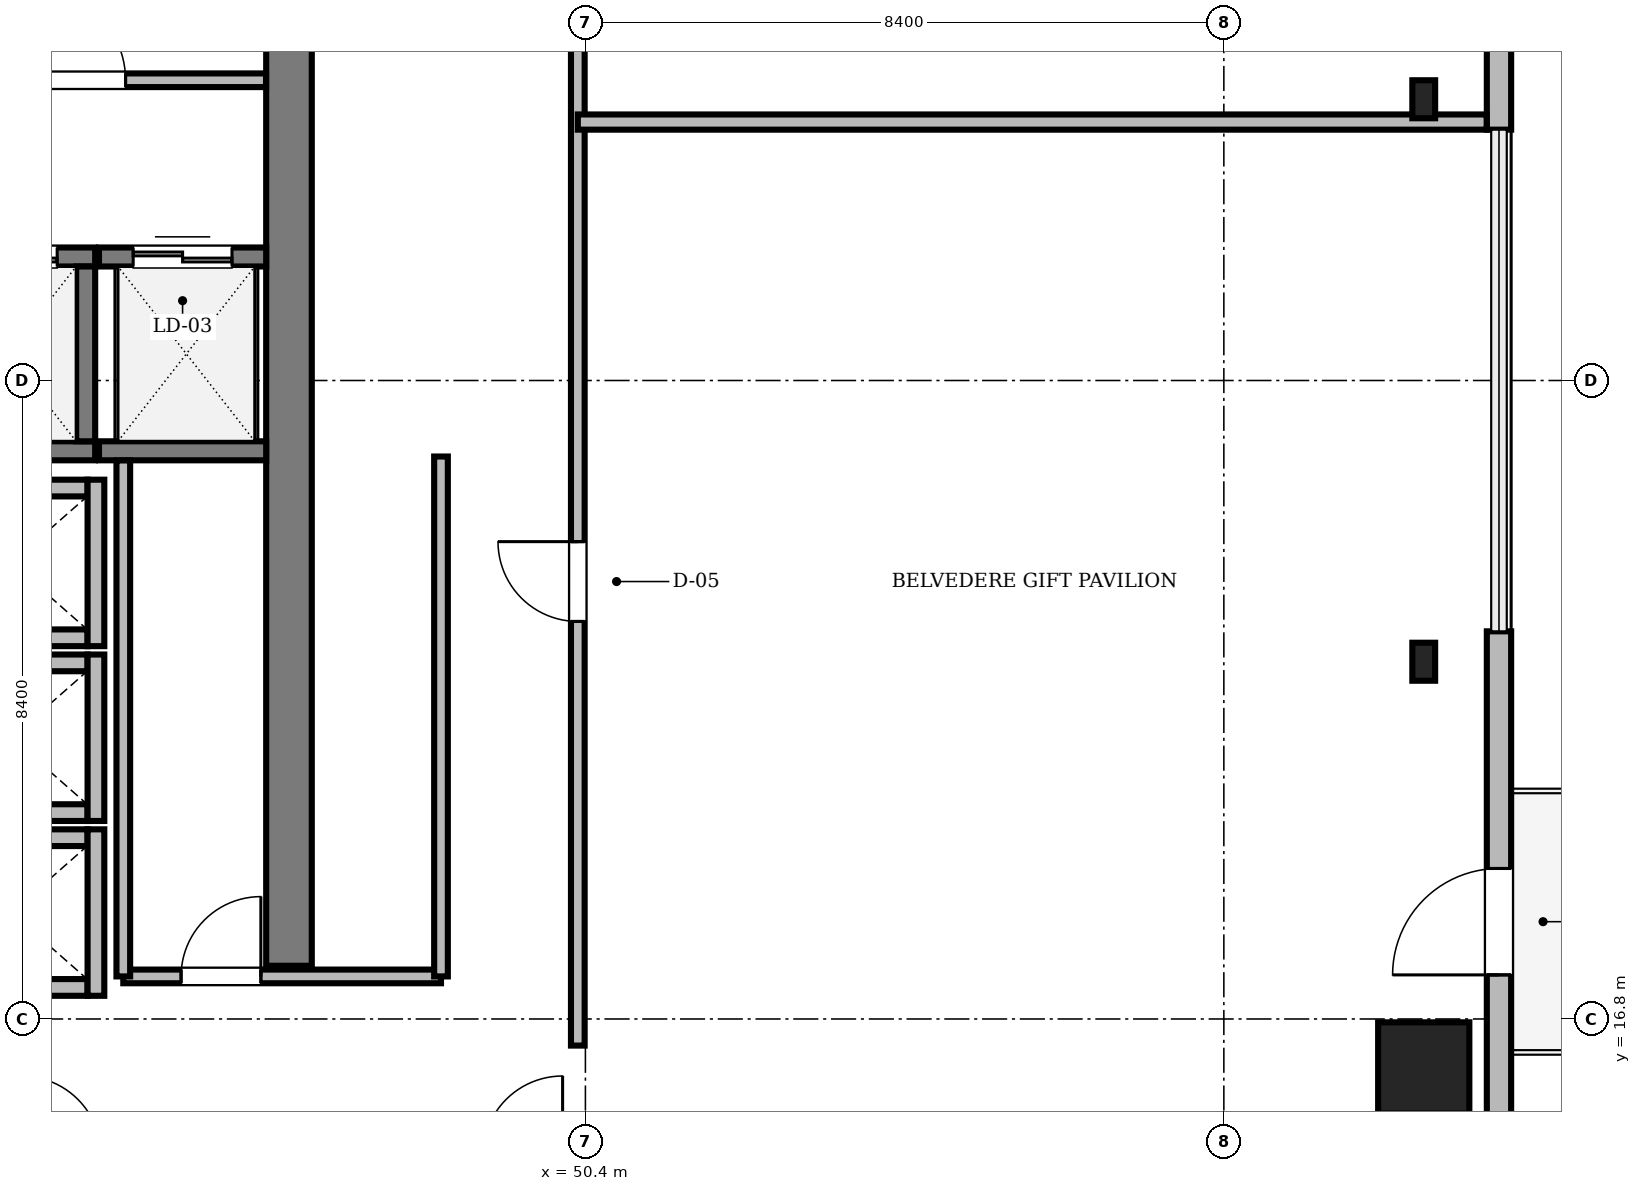
"""IFC4 building model, lengths in metres.
Left out: names, types, materials, properties, quantities, classifications, styles, units other than length and angle.
Written with IfcOpenShell. Run it as: python <this file> out.ifc"""

import sys

from ifc_helpers import new_model, si_unit, direction, frame, frame_2d, origin, origin_2d, place, context, subcontext, project, spatial, rectangle, i_section, extrude, source, transform, mapped, element, fill, save


model = new_model("IFC4")
c1 = context("Model", 3, precision=1e-05, world=origin(), true_north=direction((0.0, 1.0)))
c2 = subcontext(c1, "Body", "Model", "MODEL_VIEW")
j1 = project(units=[si_unit("LENGTHUNIT", "METRE"), si_unit("PLANEANGLEUNIT", "RADIAN")], contexts=[c1])
p1 = place(None, origin())
s1 = spatial("IfcSite", under=j1, at=p1, CompositionType="ELEMENT")
p2 = place(p1, origin())
s2 = spatial("IfcBuilding", under=s1, at=p2, CompositionType="ELEMENT")
p3 = place(p2, frame((0.0, 0.0, 286.15)))
s3 = spatial("IfcBuildingStorey", under=s2, at=p3, CompositionType="ELEMENT", Elevation=286.15)
m1 = source(origin(), c2, "Body", "SweptSolid", [
    extrude(rectangle(XDim=13.15, YDim=0.6, at=frame_2d((6.575, 0.0))), origin(), (0.0, 0.0, 1.0), 4.7),
])
p4 = place(p3, frame((46.5, 17.5, 0.0), z_axis=(0.0, 0.0, 1.0), x_axis=(0.0, 1.0, 0.0)))
e1 = element("IfcWall", 1, at=p4, inside=s3, PredefinedType="SHEAR", context=c2, shape_type="MappedRepresentation", body=[
    mapped(m1, transform((0.0, 0.0, 0.0), scale=1.0)),
])
m2 = source(origin(), c2, "Body", "SweptSolid", [
    extrude(rectangle(XDim=1.2, YDim=1.2, at=origin_2d()), origin(), (0.0, 0.0, 1.0), 4.738),
])
p5 = place(p3, frame((61.43, 16.156, 0.0), z_axis=(-0.113979944671, 0.053949820104, 0.992017131467), x_axis=(-0.427822851259, -0.90386260457, 0.0)))
e2 = element("IfcColumn", 2, at=p5, inside=s3, PredefinedType="COLUMN", context=c2, shape_type="MappedRepresentation", body=[
    mapped(m2, transform((0.0, 0.0, 0.0), scale=1.0)),
])
m3 = source(origin(), c2, "Body", "SweptSolid", [
    extrude(i_section(OverallWidth=0.3, OverallDepth=0.5, WebThickness=0.014, FlangeThickness=0.028, FilletRadius=0.027, at=origin_2d()), origin(), (0.0, 0.0, 1.0), 4.731),
])
for number, where, z_axis, x_axis in (
    (3, (61.43, 21.5, 0.0), (-0.114, 0.0, 0.993), (0.0, -1.0, 0.0)),
    (4, (61.43, 28.9, 0.0), (-0.114, 0.0, 0.993), (0.0, -1.0, 0.0)),
):
    element("IfcColumn", number, at=place(p3, frame(where, z_axis=z_axis, x_axis=x_axis)), inside=s3, PredefinedType="COLUMN", context=c2, shape_type="MappedRepresentation", body=[
        mapped(m3, transform((0.0, 0.0, 0.0), scale=1.0)),
    ])
m4 = source(origin(), c2, "Body", "SweptSolid", [
    extrude(rectangle(XDim=11.773, YDim=0.32, at=frame_2d((5.886, 0.0))), origin(), (0.0, 0.0, 1.0), 4.7),
])
p6 = place(p3, frame((62.42, 10.127, 0.0), z_axis=(0.0, 0.0, 1.0), x_axis=(0.0, 1.0, 0.0)))
e5 = element("IfcWall", 5, at=p6, inside=s3, PredefinedType="SOLIDWALL", context=c2, shape_type="MappedRepresentation", body=[
    mapped(m4, transform((0.0, 0.0, 0.0), scale=1.0)),
])
m5 = source(origin(), c2, "Body", "SweptSolid", [
    extrude(rectangle(XDim=1.4, YDim=2.3, at=frame_2d((0.7, 1.15))), frame((0.0, 0.17, 0.0), z_axis=(0.0, -1.0, 0.0), x_axis=(1.0, 0.0, 0.0)), (0.0, 0.0, 1.0), 0.34),
])
p7 = place(p6, frame((7.253, 0.0, 0.0)))
e6 = element("IfcOpeningElement", 6, at=p7, cuts=e5, PredefinedType="OPENING", context=c2, shape_type="MappedRepresentation", body=[
    mapped(m5, transform((0.0, 0.0, 0.0), scale=1.0)),
])
m6 = source(origin(), c2, "Body", "SweptSolid", [
    extrude(rectangle(XDim=2.4, YDim=3.2, at=frame_2d((1.2, 1.6))), frame((0.0, 0.17, 0.0), z_axis=(0.0, -1.0, 0.0), x_axis=(1.0, 0.0, 0.0)), (0.0, 0.0, 1.0), 0.34),
])
p8 = place(p6, frame((2.14, 0.0, 0.72)))
e7 = element("IfcOpeningElement", 7, at=p8, cuts=e5, PredefinedType="OPENING", context=c2, shape_type="MappedRepresentation", body=[
    mapped(m6, transform((0.0, 0.0, 0.0), scale=1.0)),
])
p9 = place(p3, frame((62.42, 28.5, 0.0), z_axis=(0.0, 0.0, 1.0), x_axis=(0.0, 1.0, 0.0)))
e8 = element("IfcWall", 8, at=p9, inside=s3, PredefinedType="SOLIDWALL", context=c2, shape_type="MappedRepresentation", body=[
    mapped(m4, transform((0.0, 0.0, 0.0), scale=1.0)),
])
p10 = place(p9, frame((7.233, 0.0, 0.72)))
e9 = element("IfcOpeningElement", 9, at=p10, cuts=e8, PredefinedType="OPENING", context=c2, shape_type="MappedRepresentation", body=[
    mapped(m6, transform((0.0, 0.0, 0.0), scale=1.0)),
])
m7 = source(origin(), c2, "Body", "SweptSolid", [
    extrude(rectangle(XDim=2.0, YDim=0.22, at=frame_2d((1.0, 0.0))), origin(), (0.0, 0.0, 1.0), 4.7),
])
for number, where, z_axis, x_axis in (
    (10, (41.85, 21.815, 0.0), (0.0, 0.0, 1.0), (1.0, 0.0, 0.0)),
    (11, (41.85, 23.785, 0.0), (0.0, 0.0, 1.0), (1.0, 0.0, 0.0)),
):
    element("IfcWall", number, at=place(p3, frame(where, z_axis=z_axis, x_axis=x_axis)), inside=s3, PredefinedType="SOLIDWALL", context=c2, shape_type="MappedRepresentation", body=[
        mapped(m7, transform((0.0, 0.0, 0.0), scale=1.0)),
    ])
m8 = source(origin(), c2, "Body", "SweptSolid", [
    extrude(rectangle(XDim=2.19, YDim=0.22, at=frame_2d((1.095, 0.0))), origin(), (0.0, 0.0, 1.0), 4.422),
])
p11 = place(p3, frame((43.96, 21.705, 0.0), z_axis=(0.0, 0.0, 1.0), x_axis=(0.0, 1.0, 0.0)))
e12 = element("IfcWall", 12, at=p11, inside=s3, PredefinedType="SOLIDWALL", context=c2, shape_type="MappedRepresentation", body=[
    mapped(m8, transform((0.0, 0.0, 0.0), scale=1.0)),
])
for number, where, z_axis, x_axis in (
    (13, (41.85, 19.515, 0.0), (0.0, 0.0, 1.0), (1.0, 0.0, 0.0)),
    (14, (41.85, 21.485, 0.0), (0.0, 0.0, 1.0), (1.0, 0.0, 0.0)),
):
    element("IfcWall", number, at=place(p3, frame(where, z_axis=z_axis, x_axis=x_axis)), inside=s3, PredefinedType="SOLIDWALL", context=c2, shape_type="MappedRepresentation", body=[
        mapped(m7, transform((0.0, 0.0, 0.0), scale=1.0)),
    ])
m9 = source(origin(), c2, "Body", "SweptSolid", [
    extrude(rectangle(XDim=2.19, YDim=0.22, at=frame_2d((1.095, 0.0))), origin(), (0.0, 0.0, 1.0), 4.7),
])
p12 = place(p3, frame((43.96, 19.405, 0.0), z_axis=(0.0, 0.0, 1.0), x_axis=(0.0, 1.0, 0.0)))
e15 = element("IfcWall", 15, at=p12, inside=s3, PredefinedType="SOLIDWALL", context=c2, shape_type="MappedRepresentation", body=[
    mapped(m9, transform((0.0, 0.0, 0.0), scale=1.0)),
])
m10 = source(origin(), c2, "Body", "SweptSolid", [
    extrude(rectangle(XDim=2.0, YDim=0.22, at=frame_2d((1.0, 0.0))), origin(), (0.0, 0.0, 1.0), 4.142),
])
p13 = place(p3, frame((41.85, 17.215, 0.0), z_axis=(0.0, 0.0, 1.0), x_axis=(1.0, 0.0, 0.0)))
e16 = element("IfcWall", 16, at=p13, inside=s3, PredefinedType="SOLIDWALL", context=c2, shape_type="MappedRepresentation", body=[
    mapped(m10, transform((0.0, 0.0, 0.0), scale=1.0)),
])
m11 = source(origin(), c2, "Body", "SweptSolid", [
    extrude(rectangle(XDim=2.0, YDim=0.22, at=frame_2d((1.0, 0.0))), origin(), (0.0, 0.0, 1.0), 4.422),
])
p14 = place(p3, frame((41.85, 19.185, 0.0), z_axis=(0.0, 0.0, 1.0), x_axis=(1.0, 0.0, 0.0)))
e17 = element("IfcWall", 17, at=p14, inside=s3, PredefinedType="SOLIDWALL", context=c2, shape_type="MappedRepresentation", body=[
    mapped(m11, transform((0.0, 0.0, 0.0), scale=1.0)),
])
m12 = source(origin(), c2, "Body", "SweptSolid", [
    extrude(rectangle(XDim=2.19, YDim=0.22, at=frame_2d((1.095, 0.0))), origin(), (0.0, 0.0, 1.0), 4.142),
])
p15 = place(p3, frame((43.96, 17.105, 0.0), z_axis=(0.0, 0.0, 1.0), x_axis=(0.0, 1.0, 0.0)))
e18 = element("IfcWall", 18, at=p15, inside=s3, PredefinedType="SOLIDWALL", context=c2, shape_type="MappedRepresentation", body=[
    mapped(m12, transform((0.0, 0.0, 0.0), scale=1.0)),
])
m13 = source(origin(), c2, "Body", "SweptSolid", [
    extrude(rectangle(XDim=2.3, YDim=0.25, at=frame_2d((1.15, 0.0))), origin(), (0.0, 0.0, 1.0), 4.7),
])
p16 = place(p3, frame((41.65, 24.275, 0.0), z_axis=(0.0, 0.0, 1.0), x_axis=(1.0, 0.0, 0.0)))
e19 = element("IfcWall", 19, at=p16, inside=s3, PredefinedType="SOLIDWALL", context=c2, shape_type="MappedRepresentation", body=[
    mapped(m13, transform((0.0, 0.0, 0.0), scale=1.0)),
])
p17 = place(p3, frame((41.65, 26.825, 0.0), z_axis=(0.0, 0.0, 1.0), x_axis=(1.0, 0.0, 0.0)))
e20 = element("IfcWall", 20, at=p17, inside=s3, PredefinedType="SOLIDWALL", context=c2, shape_type="MappedRepresentation", body=[
    mapped(m13, transform((0.0, 0.0, 0.0), scale=1.0)),
])
m14 = source(origin(), c2, "Body", "SweptSolid", [
    extrude(rectangle(XDim=1.3, YDim=2.3, at=frame_2d((0.65, 1.15))), frame((0.0, 0.135, 0.0), z_axis=(0.0, -1.0, 0.0), x_axis=(1.0, 0.0, 0.0)), (0.0, 0.0, 1.0), 0.27),
])
p18 = place(p17, frame((0.5, 0.0, 0.0)))
e21 = element("IfcOpeningElement", 21, at=p18, cuts=e20, PredefinedType="OPENING", context=c2, shape_type="MappedRepresentation", body=[
    mapped(m14, transform((0.0, 0.0, 0.0), scale=1.0)),
])
p19 = place(p3, frame((43.825, 24.4, 0.0), z_axis=(0.0, 0.0, 1.0), x_axis=(0.0, 1.0, 0.0)))
e22 = element("IfcWall", 22, at=p19, inside=s3, PredefinedType="SOLIDWALL", context=c2, shape_type="MappedRepresentation", body=[
    mapped(m13, transform((0.0, 0.0, 0.0), scale=1.0)),
])
m15 = source(origin(), c2, "Body", "SweptSolid", [
    extrude(rectangle(XDim=2.2, YDim=0.25, at=frame_2d((1.1, 0.0))), origin(), (0.0, 0.0, 1.0), 4.7),
])
p20 = place(p3, frame((44.0, 24.275, 0.0), z_axis=(0.0, 0.0, 1.0), x_axis=(1.0, 0.0, 0.0)))
e23 = element("IfcWall", 23, at=p20, inside=s3, PredefinedType="SOLIDWALL", context=c2, shape_type="MappedRepresentation", body=[
    mapped(m15, transform((0.0, 0.0, 0.0), scale=1.0)),
])
p21 = place(p3, frame((44.0, 26.825, 0.0), z_axis=(0.0, 0.0, 1.0), x_axis=(1.0, 0.0, 0.0)))
e24 = element("IfcWall", 24, at=p21, inside=s3, PredefinedType="SOLIDWALL", context=c2, shape_type="MappedRepresentation", body=[
    mapped(m15, transform((0.0, 0.0, 0.0), scale=1.0)),
])
p22 = place(p21, frame((0.45, 0.0, 0.0)))
e25 = element("IfcOpeningElement", 25, at=p22, cuts=e24, PredefinedType="OPENING", context=c2, shape_type="MappedRepresentation", body=[
    mapped(m14, transform((0.0, 0.0, 0.0), scale=1.0)),
])
m16 = source(origin(), c2, "Body", "SweptSolid", [
    extrude(rectangle(XDim=27.508, YDim=0.18, at=frame_2d((13.754, 0.0))), origin(), (0.0, 0.0, 1.0), 3.942),
])
p23 = place(p3, frame((50.3, 16.45, 0.0), z_axis=(0.0, 0.0, 1.0), x_axis=(0.0, 1.0, 0.0)))
e26 = element("IfcWall", 26, at=p23, inside=s3, PredefinedType="PARTITIONING", context=c2, shape_type="MappedRepresentation", body=[
    mapped(m16, transform((0.0, 0.0, 0.0), scale=1.0)),
])
m17 = source(origin(), c2, "Body", "SweptSolid", [
    extrude(rectangle(XDim=1.05, YDim=2.2, at=frame_2d((0.525, 1.1))), frame((0.0, 0.1, 0.0), z_axis=(0.0, -1.0, 0.0), x_axis=(1.0, 0.0, 0.0)), (0.0, 0.0, 1.0), 0.2),
])
p24 = place(p23, frame((5.58, 0.0, 0.0)))
e27 = element("IfcOpeningElement", 27, at=p24, cuts=e26, PredefinedType="OPENING", context=c2, shape_type="MappedRepresentation", body=[
    mapped(m17, transform((0.0, 0.0, 0.0), scale=1.0)),
])
p25 = place(p23, frame((19.295, 0.0, 0.0)))
e28 = element("IfcOpeningElement", 28, at=p25, cuts=e26, PredefinedType="OPENING", context=c2, shape_type="MappedRepresentation", body=[
    mapped(m17, transform((0.0, 0.0, 0.0), scale=1.0)),
])
m18 = source(origin(), c2, "Body", "SweptSolid", [
    extrude(rectangle(XDim=4.648, YDim=0.18, at=frame_2d((2.324, 0.0))), origin(), (0.0, 0.0, 1.0), 4.332),
])
p26 = place(p3, frame((41.55, 29.15, 0.0), z_axis=(0.0, 0.0, 1.0), x_axis=(1.0, 0.0, 0.0)))
e29 = element("IfcWall", 29, at=p26, inside=s3, PredefinedType="PARTITIONING", context=c2, shape_type="MappedRepresentation", body=[
    mapped(m18, transform((0.0, 0.0, 0.0), scale=1.0)),
])
m19 = source(origin(), c2, "Body", "SweptSolid", [
    extrude(rectangle(XDim=1.2, YDim=2.2, at=frame_2d((0.6, 1.1))), frame((0.0, 0.1, 0.0), z_axis=(0.0, -1.0, 0.0), x_axis=(1.0, 0.0, 0.0)), (0.0, 0.0, 1.0), 0.2),
])
p27 = place(p26, frame((1.6, 0.0, 0.0)))
e30 = element("IfcOpeningElement", 30, at=p27, cuts=e29, PredefinedType="OPENING", context=c2, shape_type="MappedRepresentation", body=[
    mapped(m19, transform((0.0, 0.0, 0.0), scale=1.0)),
])
m20 = source(origin(), c2, "Body", "SweptSolid", [
    extrude(rectangle(XDim=4.18, YDim=0.18, at=frame_2d((2.09, 0.0))), origin(), (0.0, 0.0, 1.0), 4.142),
])
p28 = place(p3, frame((44.32, 17.36, 0.0), z_axis=(0.0, 0.0, 1.0), x_axis=(1.0, 0.0, 0.0)))
e31 = element("IfcWall", 31, at=p28, inside=s3, PredefinedType="PARTITIONING", context=c2, shape_type="MappedRepresentation", body=[
    mapped(m20, transform((0.0, 0.0, 0.0), scale=1.0)),
])
p29 = place(p28, frame((0.76, 0.0, 0.0)))
e32 = element("IfcOpeningElement", 32, at=p29, cuts=e31, PredefinedType="OPENING", context=c2, shape_type="MappedRepresentation", body=[
    mapped(m17, transform((0.0, 0.0, 0.0), scale=1.0)),
])
m21 = source(origin(), c2, "Body", "SweptSolid", [
    extrude(rectangle(XDim=11.958, YDim=0.2, at=frame_2d((5.979, 0.0))), origin(), (0.0, 0.0, 1.0), 3.942),
])
p30 = place(p3, frame((50.3, 28.6, 0.0), z_axis=(0.0, 0.0, 1.0), x_axis=(1.0, 0.0, 0.0)))
e33 = element("IfcWall", 33, at=p30, inside=s3, PredefinedType="PARTITIONING", context=c2, shape_type="MappedRepresentation", body=[
    mapped(m21, transform((0.0, 0.0, 0.0), scale=1.0)),
])
m22 = source(origin(), c2, "Body", "SweptSolid", [
    extrude(rectangle(XDim=6.788, YDim=0.18, at=frame_2d((3.394, 0.0))), origin(), (0.0, 0.0, 1.0), 4.142),
])
p31 = place(p3, frame((44.32, 17.36, 0.0), z_axis=(0.0, 0.0, 1.0), x_axis=(0.0, 1.0, 0.0)))
e34 = element("IfcWall", 34, at=p31, inside=s3, PredefinedType="PARTITIONING", context=c2, shape_type="MappedRepresentation", body=[
    mapped(m22, transform((0.0, 0.0, 0.0), scale=1.0)),
])
m23 = source(origin(), c2, "Body", "SweptSolid", [
    extrude(rectangle(XDim=6.84, YDim=0.18, at=frame_2d((3.42, 0.0))), origin(), (0.0, 0.0, 1.0), 4.142),
])
p32 = place(p3, frame((48.5, 17.36, 0.0), z_axis=(0.0, 0.0, 1.0), x_axis=(0.0, 1.0, 0.0)))
e35 = element("IfcWall", 35, at=p32, inside=s3, PredefinedType="PARTITIONING", context=c2, shape_type="MappedRepresentation", body=[
    mapped(m23, transform((0.0, 0.0, 0.0), scale=1.0)),
])
m24 = source(origin(), c2, "Body", "SweptSolid", [
    extrude(rectangle(XDim=1.4, YDim=2.3, at=frame_2d((0.7, 1.15))), frame((0.0, 0.025, 0.0), z_axis=(0.0, -1.0, 0.0), x_axis=(1.0, 0.0, 0.0)), (0.0, 0.0, 1.0), 0.05),
])
p33 = place(p7, frame((1.4, 0.0, 0.0), z_axis=(0.0, 0.0, 1.0), x_axis=(-1.0, 0.0, 0.0)))
e36 = element("IfcDoor", 36, at=p33, inside=s3, OperationType="DOUBLE_DOOR_SLIDING", PredefinedType="DOOR", context=c2, shape_type="MappedRepresentation", body=[
    mapped(m24, transform((0.0, 0.0, 0.0), scale=1.0)),
])
fill(e6, e36)
m25 = source(origin(), c2, "Body", "SweptSolid", [
    extrude(rectangle(XDim=1.3, YDim=2.3, at=frame_2d((0.65, 1.15))), frame((0.0, 0.025, 0.0), z_axis=(0.0, -1.0, 0.0), x_axis=(1.0, 0.0, 0.0)), (0.0, 0.0, 1.0), 0.05),
])
p34 = place(p18, origin())
e37 = element("IfcDoor", 37, at=p34, inside=s3, OperationType="DOUBLE_DOOR_SLIDING", PredefinedType="DOOR", context=c2, shape_type="MappedRepresentation", body=[
    mapped(m25, transform((0.0, 0.0, 0.0), scale=1.0)),
])
fill(e21, e37)
p35 = place(p22, origin())
e38 = element("IfcDoor", 38, at=p35, inside=s3, OperationType="DOUBLE_DOOR_SLIDING", PredefinedType="DOOR", context=c2, shape_type="MappedRepresentation", body=[
    mapped(m25, transform((0.0, 0.0, 0.0), scale=1.0)),
])
fill(e25, e38)
m26 = source(origin(), c2, "Body", "SweptSolid", [
    extrude(rectangle(XDim=1.05, YDim=2.2, at=frame_2d((0.525, 1.1))), frame((0.0, 0.025, 0.0), z_axis=(0.0, -1.0, 0.0), x_axis=(1.0, 0.0, 0.0)), (0.0, 0.0, 1.0), 0.05),
])
p36 = place(p24, origin())
e39 = element("IfcDoor", 39, at=p36, inside=s3, OperationType="SINGLE_SWING_RIGHT", PredefinedType="DOOR", context=c2, shape_type="MappedRepresentation", body=[
    mapped(m26, transform((0.0, 0.0, 0.0), scale=1.0)),
])
fill(e27, e39)
m27 = source(origin(), c2, "Body", "SweptSolid", [
    extrude(rectangle(XDim=1.2, YDim=2.2, at=frame_2d((0.6, 1.1))), frame((0.0, 0.025, 0.0), z_axis=(0.0, -1.0, 0.0), x_axis=(1.0, 0.0, 0.0)), (0.0, 0.0, 1.0), 0.05),
])
p37 = place(p27, origin())
e40 = element("IfcDoor", 40, at=p37, inside=s3, OperationType="SINGLE_SWING_LEFT", PredefinedType="DOOR", context=c2, shape_type="MappedRepresentation", body=[
    mapped(m27, transform((0.0, 0.0, 0.0), scale=1.0)),
])
fill(e30, e40)
p38 = place(p29, origin())
e41 = element("IfcDoor", 41, at=p38, inside=s3, OperationType="SINGLE_SWING_RIGHT", PredefinedType="DOOR", context=c2, shape_type="MappedRepresentation", body=[
    mapped(m26, transform((0.0, 0.0, 0.0), scale=1.0)),
])
fill(e32, e41)
save(model, sys.argv[1])
